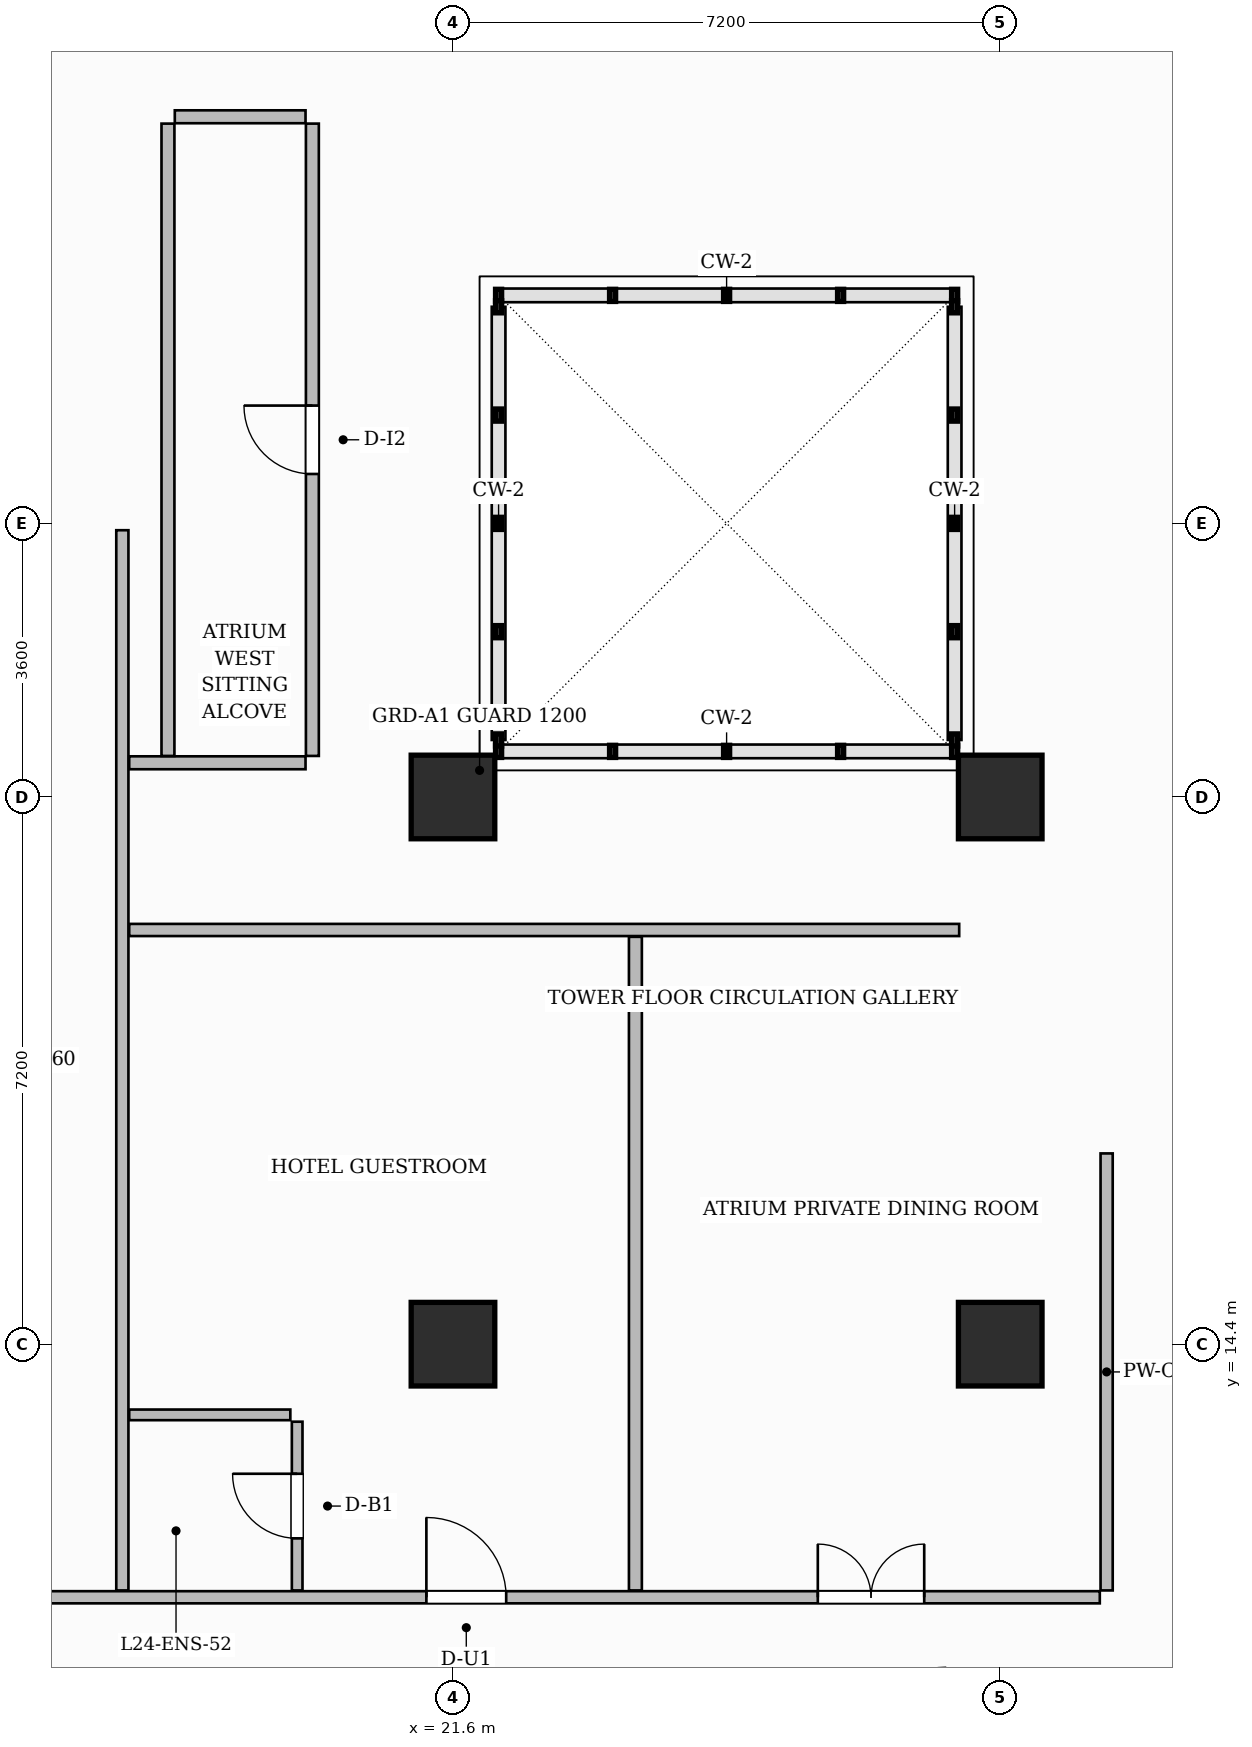
"""IFC4 building model, lengths in metres.
Left out: names, types, materials, properties, quantities, classifications, styles, units other than length and angle.
Written with IfcOpenShell. Run it as: python <this file> out.ifc"""

import sys

from ifc_helpers import new_model, si_unit, direction, frame, frame_2d, origin, origin_2d, place, context, subcontext, project, spatial, rectangle, extrude, source, transform, mapped, element, fill, save


model = new_model("IFC4")
c1 = context("Model", 3, precision=1e-05, world=origin(), true_north=direction((0.0, 1.0)))
c2 = subcontext(c1, "Body", "Model", "MODEL_VIEW")
j1 = project(units=[si_unit("LENGTHUNIT", "METRE"), si_unit("PLANEANGLEUNIT", "RADIAN")], contexts=[c1])
p1 = place(None, origin())
s1 = spatial("IfcSite", under=j1, at=p1, CompositionType="ELEMENT")
p2 = place(p1, origin())
s2 = spatial("IfcBuilding", under=s1, at=p2, CompositionType="ELEMENT")
p3 = place(p2, frame((0.0, 0.0, 99.0)))
s3 = spatial("IfcBuildingStorey", under=s2, at=p3, CompositionType="ELEMENT", Elevation=99.0)
m1 = source(origin(), c2, "Body", "SweptSolid", [
    extrude(rectangle(XDim=1.1, YDim=1.1, at=origin_2d()), origin(), (0.0, 0.0, 1.0), 3.7),
])
for number, where, z_axis, x_axis in (
    (1, (21.6, 14.4, 0.0), (0.0, 0.0, 1.0), (1.0, 0.0, 0.0)),
    (2, (21.6, 21.6, 0.0), (0.0, 0.0, 1.0), (1.0, 0.0, 0.0)),
    (3, (28.8, 14.4, 0.0), (0.0, 0.0, 1.0), (1.0, 0.0, 0.0)),
    (4, (28.8, 21.6, 0.0), (0.0, 0.0, 1.0), (1.0, 0.0, 0.0)),
):
    element("IfcColumn", number, at=place(p3, frame(where, z_axis=z_axis, x_axis=x_axis)), inside=s3, PredefinedType="COLUMN", context=c2, shape_type="MappedRepresentation", body=[
        mapped(m1, transform((0.0, 0.0, 0.0), scale=1.0)),
    ])
p4 = place(p3, frame((14.568, 11.07, 0.0), z_axis=(0.0, 0.0, 1.0), x_axis=(1.0, 0.0, 0.0)))
e5 = element("IfcWall", 5, at=p4, inside=s3, PredefinedType="PARTITIONING", context=c2, shape_type="SweptSolid", body=[
    extrude(rectangle(XDim=15.542, YDim=0.16, at=frame_2d((7.771, 0.0))), origin(), (0.0, 0.0, 1.0), 3.45),
])
p5 = place(p4, frame((6.682, 0.0, 0.0)))
e6 = element("IfcOpeningElement", 6, at=p5, cuts=e5, PredefinedType="OPENING", context=c2, shape_type="SweptSolid", body=[
    extrude(rectangle(XDim=1.05, YDim=2.25, at=frame_2d((0.525, 1.125))), frame((0.0, 0.09, 0.0), z_axis=(0.0, -1.0, 0.0), x_axis=(1.0, 0.0, 0.0)), (0.0, 0.0, 1.0), 0.18),
])
p6 = place(p4, frame((11.832, 0.0, 0.0)))
e7 = element("IfcOpeningElement", 7, at=p6, cuts=e5, PredefinedType="OPENING", context=c2, shape_type="SweptSolid", body=[
    extrude(rectangle(XDim=1.4, YDim=2.35, at=frame_2d((0.7, 1.175))), frame((0.0, 0.09, 0.0), z_axis=(0.0, -1.0, 0.0), x_axis=(1.0, 0.0, 0.0)), (0.0, 0.0, 1.0), 0.18),
])
p7 = place(p3, frame((30.2, 11.16, 0.0), z_axis=(0.0, 0.0, 1.0), x_axis=(0.0, 1.0, 0.0)))
e8 = element("IfcWall", 8, at=p7, inside=s3, PredefinedType="PARTITIONING", context=c2, shape_type="SweptSolid", body=[
    extrude(rectangle(XDim=5.75, YDim=0.16, at=frame_2d((2.875, 0.0))), origin(), (0.0, 0.0, 1.0), 3.45),
])
p8 = place(p3, frame((17.25, 11.16, 0.0), z_axis=(0.0, 0.0, 1.0), x_axis=(0.0, 1.0, 0.0)))
e9 = element("IfcWall", 9, at=p8, inside=s3, PredefinedType="PARTITIONING", context=c2, shape_type="SweptSolid", body=[
    extrude(rectangle(XDim=13.95, YDim=0.16, at=frame_2d((6.975, 0.0))), origin(), (0.0, 0.0, 1.0), 3.45),
])
p9 = place(p3, frame((17.34, 22.05, 0.0), z_axis=(0.0, 0.0, 1.0), x_axis=(1.0, 0.0, 0.0)))
e10 = element("IfcWall", 10, at=p9, inside=s3, PredefinedType="PARTITIONING", context=c2, shape_type="SweptSolid", body=[
    extrude(rectangle(XDim=2.32, YDim=0.17, at=frame_2d((1.16, 0.0))), origin(), (0.0, 0.0, 1.0), 3.45),
])
p10 = place(p3, frame((17.94, 30.55, 0.0), z_axis=(0.0, 0.0, 1.0), x_axis=(1.0, 0.0, 0.0)))
e11 = element("IfcWall", 11, at=p10, inside=s3, PredefinedType="PARTITIONING", context=c2, shape_type="SweptSolid", body=[
    extrude(rectangle(XDim=1.72, YDim=0.17, at=frame_2d((0.86, 0.0))), origin(), (0.0, 0.0, 1.0), 3.45),
])
p11 = place(p3, frame((17.85, 22.14, 0.0), z_axis=(0.0, 0.0, 1.0), x_axis=(0.0, 1.0, 0.0)))
e12 = element("IfcWall", 12, at=p11, inside=s3, PredefinedType="PARTITIONING", context=c2, shape_type="SweptSolid", body=[
    extrude(rectangle(XDim=8.32, YDim=0.17, at=frame_2d((4.16, 0.0))), origin(), (0.0, 0.0, 1.0), 3.45),
])
p12 = place(p3, frame((19.75, 22.14, 0.0), z_axis=(0.0, 0.0, 1.0), x_axis=(0.0, 1.0, 0.0)))
e13 = element("IfcWall", 13, at=p12, inside=s3, PredefinedType="PARTITIONING", context=c2, shape_type="SweptSolid", body=[
    extrude(rectangle(XDim=8.32, YDim=0.17, at=frame_2d((4.16, 0.0))), origin(), (0.0, 0.0, 1.0), 3.45),
])
p13 = place(p12, frame((3.71, 0.0, 0.0)))
e14 = element("IfcOpeningElement", 14, at=p13, cuts=e13, PredefinedType="OPENING", context=c2, shape_type="SweptSolid", body=[
    extrude(rectangle(XDim=0.9, YDim=2.15, at=frame_2d((0.45, 1.075))), frame((0.0, 0.095, 0.0), z_axis=(0.0, -1.0, 0.0), x_axis=(1.0, 0.0, 0.0)), (0.0, 0.0, 1.0), 0.19),
])
p14 = place(p3, frame((17.34, 19.85, 0.0), z_axis=(0.0, 0.0, 1.0), x_axis=(1.0, 0.0, 0.0)))
e15 = element("IfcWall", 15, at=p14, inside=s3, PredefinedType="PARTITIONING", context=c2, shape_type="SweptSolid", body=[
    extrude(rectangle(XDim=10.92, YDim=0.16, at=frame_2d((5.46, 0.0))), origin(), (0.0, 0.0, 1.0), 3.45),
])
p15 = place(p3, frame((24.0, 11.16, 0.0), z_axis=(0.0, 0.0, 1.0), x_axis=(0.0, 1.0, 0.0)))
e16 = element("IfcWall", 16, at=p15, inside=s3, PredefinedType="PARTITIONING", context=c2, shape_type="SweptSolid", body=[
    extrude(rectangle(XDim=8.6, YDim=0.17, at=frame_2d((4.3, 0.0))), origin(), (0.0, 0.0, 1.0), 3.45),
])
p16 = place(p3, frame((19.55, 11.16, 0.0), z_axis=(0.0, 0.0, 1.0), x_axis=(0.0, 1.0, 0.0)))
e17 = element("IfcWall", 17, at=p16, inside=s3, PredefinedType="PARTITIONING", context=c2, shape_type="SweptSolid", body=[
    extrude(rectangle(XDim=2.22, YDim=0.14, at=frame_2d((1.11, 0.0))), origin(), (0.0, 0.0, 1.0), 3.45),
])
p17 = place(p16, frame((0.685, 0.0, 0.0)))
e18 = element("IfcOpeningElement", 18, at=p17, cuts=e17, PredefinedType="OPENING", context=c2, shape_type="SweptSolid", body=[
    extrude(rectangle(XDim=0.85, YDim=2.1, at=frame_2d((0.425, 1.05))), frame((0.0, 0.08, 0.0), z_axis=(0.0, -1.0, 0.0), x_axis=(1.0, 0.0, 0.0)), (0.0, 0.0, 1.0), 0.16),
])
p18 = place(p3, frame((17.34, 13.47, 0.0), z_axis=(0.0, 0.0, 1.0), x_axis=(1.0, 0.0, 0.0)))
e19 = element("IfcWall", 19, at=p18, inside=s3, PredefinedType="PARTITIONING", context=c2, shape_type="SweptSolid", body=[
    extrude(rectangle(XDim=2.12, YDim=0.14, at=frame_2d((1.06, 0.0))), origin(), (0.0, 0.0, 1.0), 3.45),
])
m2 = source(origin(), c2, "Body", "SweptSolid", [
    extrude(rectangle(XDim=0.9, YDim=2.15, at=frame_2d((0.45, 1.075))), frame((0.0, 0.025, 0.0), z_axis=(0.0, -1.0, 0.0), x_axis=(1.0, 0.0, 0.0)), (0.0, 0.0, 1.0), 0.05),
])
p19 = place(p13, origin())
e20 = element("IfcDoor", 20, at=p19, inside=s3, OperationType="SINGLE_SWING_RIGHT", PredefinedType="DOOR", context=c2, shape_type="MappedRepresentation", body=[
    mapped(m2, transform((0.0, 0.0, 0.0), scale=1.0)),
])
fill(e14, e20)
m3 = source(origin(), c2, "Body", "SweptSolid", [
    extrude(rectangle(XDim=0.85, YDim=2.1, at=frame_2d((0.425, 1.05))), frame((0.0, 0.025, 0.0), z_axis=(0.0, -1.0, 0.0), x_axis=(1.0, 0.0, 0.0)), (0.0, 0.0, 1.0), 0.05),
])
p20 = place(p17, origin())
e21 = element("IfcDoor", 21, at=p20, inside=s3, OperationType="SINGLE_SWING_RIGHT", PredefinedType="DOOR", context=c2, shape_type="MappedRepresentation", body=[
    mapped(m3, transform((0.0, 0.0, 0.0), scale=1.0)),
])
fill(e18, e21)
m4 = source(origin(), c2, "Body", "SweptSolid", [
    extrude(rectangle(XDim=1.05, YDim=2.25, at=frame_2d((0.525, 1.125))), frame((0.0, 0.025, 0.0), z_axis=(0.0, -1.0, 0.0), x_axis=(1.0, 0.0, 0.0)), (0.0, 0.0, 1.0), 0.05),
])
p21 = place(p5, origin())
e22 = element("IfcDoor", 22, at=p21, inside=s3, OperationType="SINGLE_SWING_LEFT", PredefinedType="DOOR", context=c2, shape_type="MappedRepresentation", body=[
    mapped(m4, transform((0.0, 0.0, 0.0), scale=1.0)),
])
fill(e6, e22)
m5 = source(origin(), c2, "Body", "SweptSolid", [
    extrude(rectangle(XDim=1.4, YDim=2.35, at=frame_2d((0.7, 1.175))), frame((0.0, 0.025, 0.0), z_axis=(0.0, -1.0, 0.0), x_axis=(1.0, 0.0, 0.0)), (0.0, 0.0, 1.0), 0.05),
])
p22 = place(p6, origin())
e23 = element("IfcDoor", 23, at=p22, inside=s3, OperationType="DOUBLE_DOOR_SINGLE_SWING", PredefinedType="DOOR", context=c2, shape_type="MappedRepresentation", body=[
    mapped(m5, transform((0.0, 0.0, 0.0), scale=1.0)),
])
fill(e7, e23)
save(model, sys.argv[1])
